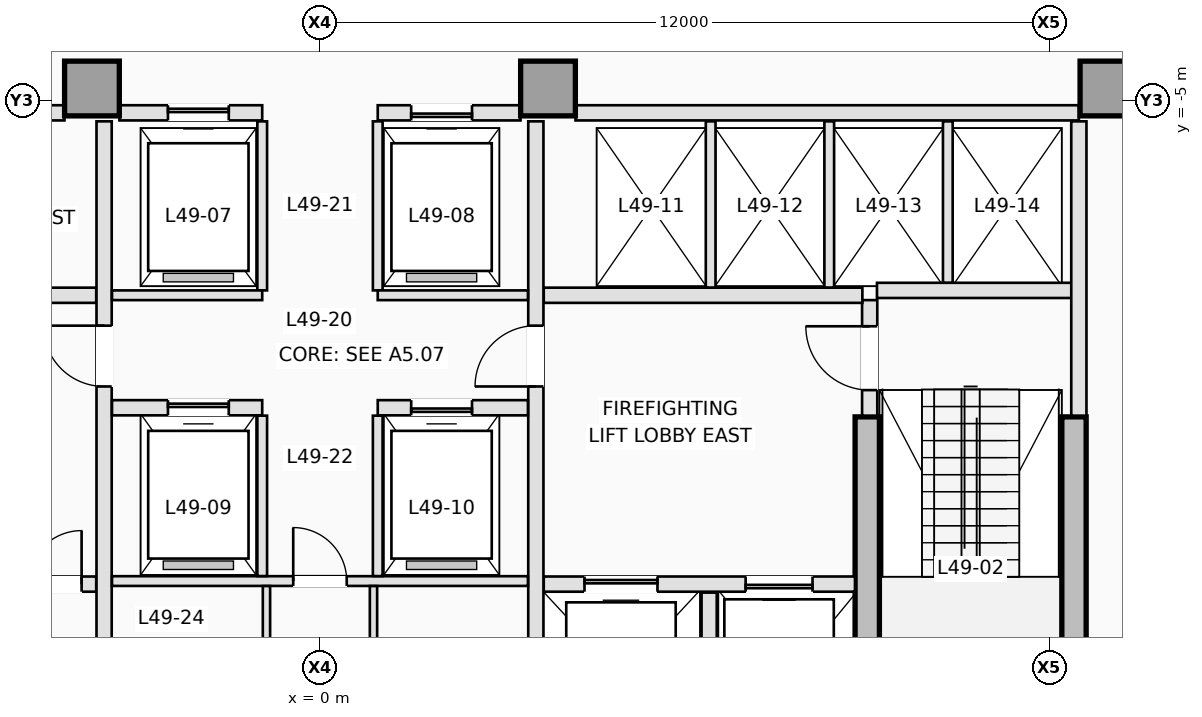
"""IFC4 building model, lengths in metres.
Left out: names, types, materials, properties, quantities, classifications, styles, units other than length and angle.
Written with IfcOpenShell. Run it as: python <this file> out.ifc"""

import sys

from ifc_helpers import new_model, si_unit, direction, frame, frame_2d, origin, origin_2d, place, context, subcontext, project, spatial, rectangle, extrude, element, fill, save


model = new_model("IFC4")
c1 = context("Model", 3, precision=1e-05, world=origin(), true_north=direction((0.0, 1.0)))
c2 = subcontext(c1, "Body", "Model", "MODEL_VIEW")
j1 = project(units=[si_unit("LENGTHUNIT", "METRE"), si_unit("PLANEANGLEUNIT", "RADIAN")], contexts=[c1])
p1 = place(None, origin())
s1 = spatial("IfcSite", under=j1, at=p1, CompositionType="ELEMENT")
p2 = place(p1, origin())
s2 = spatial("IfcBuilding", under=s1, at=p2, CompositionType="ELEMENT")
p3 = place(p2, frame((0.0, 0.0, 179.0)))
s3 = spatial("IfcBuildingStorey", under=s2, at=p3, CompositionType="ELEMENT", Elevation=179.0)
p4 = place(p3, frame((12.4, -15.7, 0.0), z_axis=(0.0, 0.0, 1.0), x_axis=(0.0, 1.0, 0.0)))
e1 = element("IfcWall", 1, at=p4, inside=s3, PredefinedType="SHEAR", context=c2, shape_type="SweptSolid", body=[
    extrude(rectangle(XDim=5.5, YDim=0.4, at=frame_2d((2.75, 0.0))), origin(), (0.0, 0.0, 1.0), 4.4),
])
p5 = place(p3, frame((9.0, -16.15, 0.0), z_axis=(0.0, 0.0, 1.0), x_axis=(0.0, 1.0, 0.0)))
e2 = element("IfcWall", 2, at=p5, inside=s3, PredefinedType="SHEAR", context=c2, shape_type="SweptSolid", body=[
    extrude(rectangle(XDim=5.95, YDim=0.4, at=frame_2d((2.975, 0.0))), origin(), (0.0, 0.0, 1.0), 4.4),
])
for number, where, z_axis, x_axis in (
    (3, (-3.75, -4.8, 0.0), (0.0, 0.0, 1.0), (1.0, 0.0, 0.0)),
    (4, (3.75, -4.8, 0.0), (0.0, 0.0, 1.0), (1.0, 0.0, 0.0)),
    (5, (12.95, -4.8, 0.0), (0.0, 0.0, 1.0), (1.0, 0.0, 0.0)),
):
    element("IfcColumn", number, at=place(p3, frame(where, z_axis=z_axis, x_axis=x_axis)), inside=s3, PredefinedType="COLUMN", context=c2, shape_type="SweptSolid", body=[
        extrude(rectangle(XDim=0.9, YDim=0.9, at=origin_2d()), origin(), (0.0, 0.0, 1.0), 4.4),
    ])
p6 = place(p3, frame((9.04, -10.18, 0.0), z_axis=(0.0, 0.0, 1.0), x_axis=(0.0, 1.0, 0.0)))
e6 = element("IfcWall", 6, at=p6, inside=s3, PredefinedType="PARTITIONING", context=c2, shape_type="SweptSolid", body=[
    extrude(rectangle(XDim=1.9, YDim=0.25, at=frame_2d((0.95, 0.0))), origin(), (0.0, 0.0, 1.0), 4.15),
])
p7 = place(p6, frame((0.42, 0.0, 0.0)))
e7 = element("IfcOpeningElement", 7, at=p7, cuts=e6, PredefinedType="OPENING", context=c2, shape_type="SweptSolid", body=[
    extrude(rectangle(XDim=1.05, YDim=2.15, at=frame_2d((0.525, 1.075))), frame((0.0, 0.135, 0.0), z_axis=(0.0, -1.0, 0.0), x_axis=(1.0, 0.0, 0.0)), (0.0, 0.0, 1.0), 0.27),
])
p8 = place(p3, frame((9.16, -8.12, 0.0), z_axis=(0.0, 0.0, 1.0), x_axis=(1.0, 0.0, 0.0)))
e8 = element("IfcWall", 8, at=p8, inside=s3, PredefinedType="PARTITIONING", context=c2, shape_type="SweptSolid", body=[
    extrude(rectangle(XDim=3.22, YDim=0.25, at=frame_2d((1.61, 0.0))), origin(), (0.0, 0.0, 1.0), 4.15),
])
p9 = place(p3, frame((12.48, -10.18, 0.0), z_axis=(0.0, 0.0, 1.0), x_axis=(0.0, 1.0, 0.0)))
e9 = element("IfcWall", 9, at=p9, inside=s3, PredefinedType="PARTITIONING", context=c2, shape_type="SweptSolid", body=[
    extrude(rectangle(XDim=4.84, YDim=0.25, at=frame_2d((2.42, 0.0))), origin(), (0.0, 0.0, 1.0), 4.15),
])
p10 = place(p3, frame((-8.798, -12.95, 0.0), z_axis=(0.0, 0.0, 1.0), x_axis=(1.0, 0.0, 0.0)))
e10 = element("IfcWall", 10, at=p10, inside=s3, PredefinedType="PARTITIONING", context=c2, shape_type="SweptSolid", body=[
    extrude(rectangle(XDim=5.118, YDim=0.25, at=frame_2d((2.559, 0.0))), origin(), (0.0, 0.0, 1.0), 4.15),
])
p11 = place(p10, frame((0.698, 0.0, 0.0)))
e11 = element("IfcOpeningElement", 11, at=p11, cuts=e10, PredefinedType="OPENING", context=c2, shape_type="SweptSolid", body=[
    extrude(rectangle(XDim=1.1, YDim=2.15, at=frame_2d((0.55, 1.075))), frame((0.0, 0.135, 0.0), z_axis=(0.0, -1.0, 0.0), x_axis=(1.0, 0.0, 0.0)), (0.0, 0.0, 1.0), 0.27),
])
p12 = place(p10, frame((2.598, 0.0, 0.0)))
e12 = element("IfcOpeningElement", 12, at=p12, cuts=e10, PredefinedType="OPENING", context=c2, shape_type="SweptSolid", body=[
    extrude(rectangle(XDim=0.88, YDim=2.1, at=frame_2d((0.44, 1.05))), frame((0.0, 0.135, 0.0), z_axis=(0.0, -1.0, 0.0), x_axis=(1.0, 0.0, 0.0)), (0.0, 0.0, 1.0), 0.27),
])
p13 = place(p10, frame((3.998, 0.0, 0.0)))
e13 = element("IfcOpeningElement", 13, at=p13, cuts=e10, PredefinedType="OPENING", context=c2, shape_type="SweptSolid", body=[
    extrude(rectangle(XDim=0.88, YDim=2.1, at=frame_2d((0.44, 1.05))), frame((0.0, 0.135, 0.0), z_axis=(0.0, -1.0, 0.0), x_axis=(1.0, 0.0, 0.0)), (0.0, 0.0, 1.0), 0.27),
])
p14 = place(p3, frame((3.68, -12.95, 0.0), z_axis=(0.0, 0.0, 1.0), x_axis=(1.0, 0.0, 0.0)))
e14 = element("IfcWall", 14, at=p14, inside=s3, PredefinedType="PARTITIONING", context=c2, shape_type="SweptSolid", body=[
    extrude(rectangle(XDim=5.118, YDim=0.25, at=frame_2d((2.559, 0.0))), origin(), (0.0, 0.0, 1.0), 4.15),
])
p15 = place(p14, frame((3.32, 0.0, 0.0)))
e15 = element("IfcOpeningElement", 15, at=p15, cuts=e14, PredefinedType="OPENING", context=c2, shape_type="SweptSolid", body=[
    extrude(rectangle(XDim=1.1, YDim=2.15, at=frame_2d((0.55, 1.075))), frame((0.0, 0.135, 0.0), z_axis=(0.0, -1.0, 0.0), x_axis=(1.0, 0.0, 0.0)), (0.0, 0.0, 1.0), 0.27),
])
p16 = place(p14, frame((0.67, 0.0, 0.0)))
e16 = element("IfcOpeningElement", 16, at=p16, cuts=e14, PredefinedType="OPENING", context=c2, shape_type="SweptSolid", body=[
    extrude(rectangle(XDim=1.2, YDim=2.15, at=frame_2d((0.6, 1.075))), frame((0.0, 0.135, 0.0), z_axis=(0.0, -1.0, 0.0), x_axis=(1.0, 0.0, 0.0)), (0.0, 0.0, 1.0), 0.27),
])
p17 = place(p3, frame((6.4, -15.92, 0.0), z_axis=(0.0, 0.0, 1.0), x_axis=(0.0, 1.0, 0.0)))
e17 = element("IfcWall", 17, at=p17, inside=s3, PredefinedType="PARTITIONING", context=c2, shape_type="SweptSolid", body=[
    extrude(rectangle(XDim=2.83, YDim=0.25, at=frame_2d((1.415, 0.0))), origin(), (0.0, 0.0, 1.0), 4.15),
])
for number, where, z_axis, x_axis in (
    (18, (-8.92, -8.2, 0.0), (0.0, 0.0, 1.0), (1.0, 0.0, 0.0)),
    (19, (3.68, -8.2, 0.0), (0.0, 0.0, 1.0), (1.0, 0.0, 0.0)),
):
    element("IfcWall", number, at=place(p3, frame(where, z_axis=z_axis, x_axis=x_axis)), inside=s3, PredefinedType="PARTITIONING", context=c2, shape_type="SweptSolid", body=[
        extrude(rectangle(XDim=5.24, YDim=0.25, at=frame_2d((2.62, 0.0))), origin(), (0.0, 0.0, 1.0), 4.15),
    ])
p18 = place(p3, frame((-3.55, -15.898, 0.0), z_axis=(0.0, 0.0, 1.0), x_axis=(0.0, 1.0, 0.0)))
e20 = element("IfcWall", 20, at=p18, inside=s3, PredefinedType="PARTITIONING", context=c2, shape_type="SweptSolid", body=[
    extrude(rectangle(XDim=10.558, YDim=0.25, at=frame_2d((5.279, 0.0))), origin(), (0.0, 0.0, 1.0), 4.15),
])
p19 = place(p18, frame((6.198, 0.0, 0.0)))
e21 = element("IfcOpeningElement", 21, at=p19, cuts=e20, PredefinedType="OPENING", context=c2, shape_type="SweptSolid", body=[
    extrude(rectangle(XDim=1.0, YDim=2.15, at=frame_2d((0.5, 1.075))), frame((0.0, 0.135, 0.0), z_axis=(0.0, -1.0, 0.0), x_axis=(1.0, 0.0, 0.0)), (0.0, 0.0, 1.0), 0.27),
])
p20 = place(p3, frame((3.55, -15.898, 0.0), z_axis=(0.0, 0.0, 1.0), x_axis=(0.0, 1.0, 0.0)))
e22 = element("IfcWall", 22, at=p20, inside=s3, PredefinedType="PARTITIONING", context=c2, shape_type="SweptSolid", body=[
    extrude(rectangle(XDim=10.558, YDim=0.25, at=frame_2d((5.279, 0.0))), origin(), (0.0, 0.0, 1.0), 4.15),
])
p21 = place(p20, frame((6.198, 0.0, 0.0)))
e23 = element("IfcOpeningElement", 23, at=p21, cuts=e22, PredefinedType="OPENING", context=c2, shape_type="SweptSolid", body=[
    extrude(rectangle(XDim=1.0, YDim=2.15, at=frame_2d((0.5, 1.075))), frame((0.0, 0.135, 0.0), z_axis=(0.0, -1.0, 0.0), x_axis=(1.0, 0.0, 0.0)), (0.0, 0.0, 1.0), 0.27),
])
p22 = place(p3, frame((-12.48, -5.2, 0.0), z_axis=(0.0, 0.0, 1.0), x_axis=(1.0, 0.0, 0.0)))
e24 = element("IfcWall", 24, at=p22, inside=s3, PredefinedType="PARTITIONING", context=c2, shape_type="SweptSolid", body=[
    extrude(rectangle(XDim=8.278, YDim=0.25, at=frame_2d((4.139, 0.0))), origin(), (0.0, 0.0, 1.0), 4.15),
])
p23 = place(p22, frame((1.85, 0.0, 0.0)))
e25 = element("IfcOpeningElement", 25, at=p23, cuts=e24, PredefinedType="OPENING", context=c2, shape_type="SweptSolid", body=[
    extrude(rectangle(XDim=1.05, YDim=2.12, at=frame_2d((0.525, 1.06))), frame((0.0, 0.135, 0.0), z_axis=(0.0, -1.0, 0.0), x_axis=(1.0, 0.0, 0.0)), (0.0, 0.0, 1.0), 0.27),
])
p24 = place(p22, frame((6.15, 0.0, 0.0)))
e26 = element("IfcOpeningElement", 26, at=p24, cuts=e24, PredefinedType="OPENING", context=c2, shape_type="SweptSolid", body=[
    extrude(rectangle(XDim=1.05, YDim=2.12, at=frame_2d((0.525, 1.06))), frame((0.0, 0.135, 0.0), z_axis=(0.0, -1.0, 0.0), x_axis=(1.0, 0.0, 0.0)), (0.0, 0.0, 1.0), 0.27),
])
p25 = place(p3, frame((4.202, -5.2, 0.0), z_axis=(0.0, 0.0, 1.0), x_axis=(1.0, 0.0, 0.0)))
e27 = element("IfcWall", 27, at=p25, inside=s3, PredefinedType="PARTITIONING", context=c2, shape_type="SweptSolid", body=[
    extrude(rectangle(XDim=8.278, YDim=0.25, at=frame_2d((4.139, 0.0))), origin(), (0.0, 0.0, 1.0), 4.15),
])
p26 = place(p3, frame((-3.298, -5.2, 0.0), z_axis=(0.0, 0.0, 1.0), x_axis=(1.0, 0.0, 0.0)))
e28 = element("IfcWall", 28, at=p26, inside=s3, PredefinedType="PARTITIONING", context=c2, shape_type="SweptSolid", body=[
    extrude(rectangle(XDim=2.348, YDim=0.25, at=frame_2d((1.174, 0.0))), origin(), (0.0, 0.0, 1.0), 4.15),
])
p27 = place(p26, frame((0.798, 0.0, 0.0)))
e29 = element("IfcOpeningElement", 29, at=p27, cuts=e28, PredefinedType="OPENING", context=c2, shape_type="SweptSolid", body=[
    extrude(rectangle(XDim=1.0, YDim=2.15, at=frame_2d((0.5, 1.075))), frame((0.0, 0.135, 0.0), z_axis=(0.0, -1.0, 0.0), x_axis=(1.0, 0.0, 0.0)), (0.0, 0.0, 1.0), 0.27),
])
p28 = place(p3, frame((0.95, -5.2, 0.0), z_axis=(0.0, 0.0, 1.0), x_axis=(1.0, 0.0, 0.0)))
e30 = element("IfcWall", 30, at=p28, inside=s3, PredefinedType="PARTITIONING", context=c2, shape_type="SweptSolid", body=[
    extrude(rectangle(XDim=2.348, YDim=0.25, at=frame_2d((1.174, 0.0))), origin(), (0.0, 0.0, 1.0), 4.15),
])
p29 = place(p28, frame((0.55, 0.0, 0.0)))
e31 = element("IfcOpeningElement", 31, at=p29, cuts=e30, PredefinedType="OPENING", context=c2, shape_type="SweptSolid", body=[
    extrude(rectangle(XDim=1.0, YDim=2.15, at=frame_2d((0.5, 1.075))), frame((0.0, 0.135, 0.0), z_axis=(0.0, -1.0, 0.0), x_axis=(1.0, 0.0, 0.0)), (0.0, 0.0, 1.0), 0.27),
])
for number, where, z_axis, x_axis in (
    (32, (6.425, -8.073, 0.0), (0.0, 0.0, 1.0), (0.0, 1.0, 0.0)),
    (33, (8.375, -8.073, 0.0), (0.0, 0.0, 1.0), (0.0, 1.0, 0.0)),
):
    element("IfcWall", number, at=place(p3, frame(where, z_axis=z_axis, x_axis=x_axis)), inside=s3, PredefinedType="PARTITIONING", context=c2, shape_type="SweptSolid", body=[
        extrude(rectangle(XDim=2.733, YDim=0.16, at=frame_2d((1.366, 0.0))), origin(), (0.0, 0.0, 1.0), 4.15),
    ])
p30 = place(p3, frame((10.325, -7.993, 0.0), z_axis=(0.0, 0.0, 1.0), x_axis=(0.0, 1.0, 0.0)))
e34 = element("IfcWall", 34, at=p30, inside=s3, PredefinedType="PARTITIONING", context=c2, shape_type="SweptSolid", body=[
    extrude(rectangle(XDim=2.653, YDim=0.16, at=frame_2d((1.326, 0.0))), origin(), (0.0, 0.0, 1.0), 4.15),
])
for number, where, z_axis, x_axis in (
    (35, (-0.95, -8.12, 0.0), (0.0, 0.0, 1.0), (0.0, 1.0, 0.0)),
    (36, (0.95, -8.12, 0.0), (0.0, 0.0, 1.0), (0.0, 1.0, 0.0)),
):
    element("IfcWall", number, at=place(p3, frame(where, z_axis=z_axis, x_axis=x_axis)), inside=s3, PredefinedType="PARTITIONING", context=c2, shape_type="SweptSolid", body=[
        extrude(rectangle(XDim=2.78, YDim=0.16, at=frame_2d((1.39, 0.0))), origin(), (0.0, 0.0, 1.0), 4.15),
    ])
for number, where, z_axis, x_axis in (
    (37, (-3.42, -8.2, 0.0), (0.0, 0.0, 1.0), (1.0, 0.0, 0.0)),
    (38, (0.95, -8.2, 0.0), (0.0, 0.0, 1.0), (1.0, 0.0, 0.0)),
):
    element("IfcWall", number, at=place(p3, frame(where, z_axis=z_axis, x_axis=x_axis)), inside=s3, PredefinedType="PARTITIONING", context=c2, shape_type="SweptSolid", body=[
        extrude(rectangle(XDim=2.47, YDim=0.16, at=frame_2d((1.235, 0.0))), origin(), (0.0, 0.0, 1.0), 4.15),
    ])
p31 = place(p3, frame((-3.42, -10.05, 0.0), z_axis=(0.0, 0.0, 1.0), x_axis=(1.0, 0.0, 0.0)))
e39 = element("IfcWall", 39, at=p31, inside=s3, PredefinedType="PARTITIONING", context=c2, shape_type="SweptSolid", body=[
    extrude(rectangle(XDim=2.47, YDim=0.25, at=frame_2d((1.235, 0.0))), origin(), (0.0, 0.0, 1.0), 4.15),
])
p32 = place(p31, frame((0.92, 0.0, 0.0)))
e40 = element("IfcOpeningElement", 40, at=p32, cuts=e39, PredefinedType="OPENING", context=c2, shape_type="SweptSolid", body=[
    extrude(rectangle(XDim=1.0, YDim=2.15, at=frame_2d((0.5, 1.075))), frame((0.0, 0.135, 0.0), z_axis=(0.0, -1.0, 0.0), x_axis=(1.0, 0.0, 0.0)), (0.0, 0.0, 1.0), 0.27),
])
p33 = place(p3, frame((0.95, -10.05, 0.0), z_axis=(0.0, 0.0, 1.0), x_axis=(1.0, 0.0, 0.0)))
e41 = element("IfcWall", 41, at=p33, inside=s3, PredefinedType="PARTITIONING", context=c2, shape_type="SweptSolid", body=[
    extrude(rectangle(XDim=2.47, YDim=0.25, at=frame_2d((1.235, 0.0))), origin(), (0.0, 0.0, 1.0), 4.15),
])
p34 = place(p33, frame((0.55, 0.0, 0.0)))
e42 = element("IfcOpeningElement", 42, at=p34, cuts=e41, PredefinedType="OPENING", context=c2, shape_type="SweptSolid", body=[
    extrude(rectangle(XDim=1.0, YDim=2.15, at=frame_2d((0.5, 1.075))), frame((0.0, 0.135, 0.0), z_axis=(0.0, -1.0, 0.0), x_axis=(1.0, 0.0, 0.0)), (0.0, 0.0, 1.0), 0.27),
])
p35 = place(p3, frame((-3.42, -12.9, 0.0), z_axis=(0.0, 0.0, 1.0), x_axis=(1.0, 0.0, 0.0)))
e43 = element("IfcWall", 43, at=p35, inside=s3, PredefinedType="PARTITIONING", context=c2, shape_type="SweptSolid", body=[
    extrude(rectangle(XDim=6.84, YDim=0.16, at=frame_2d((3.42, 0.0))), origin(), (0.0, 0.0, 1.0), 4.15),
])
p36 = place(p35, frame((2.98, 0.0, 0.0)))
e44 = element("IfcOpeningElement", 44, at=p36, cuts=e43, PredefinedType="OPENING", context=c2, shape_type="SweptSolid", body=[
    extrude(rectangle(XDim=0.88, YDim=2.12, at=frame_2d((0.44, 1.06))), frame((0.0, 0.09, 0.0), z_axis=(0.0, -1.0, 0.0), x_axis=(1.0, 0.0, 0.0)), (0.0, 0.0, 1.0), 0.18),
])
for number, where, z_axis, x_axis in (
    (45, (-0.95, -12.818, 0.0), (0.0, 0.0, 1.0), (0.0, 1.0, 0.0)),
    (46, (0.95, -12.818, 0.0), (0.0, 0.0, 1.0), (0.0, 1.0, 0.0)),
):
    element("IfcWall", number, at=place(p3, frame(where, z_axis=z_axis, x_axis=x_axis)), inside=s3, PredefinedType="PARTITIONING", context=c2, shape_type="SweptSolid", body=[
        extrude(rectangle(XDim=2.638, YDim=0.16, at=frame_2d((1.319, 0.0))), origin(), (0.0, 0.0, 1.0), 4.15),
    ])
p37 = place(p3, frame((-0.88, -16.02, 0.0), z_axis=(0.0, 0.0, 1.0), x_axis=(0.0, 1.0, 0.0)))
e47 = element("IfcWall", 47, at=p37, inside=s3, PredefinedType="PARTITIONING", context=c2, shape_type="SweptSolid", body=[
    extrude(rectangle(XDim=3.038, YDim=0.12, at=frame_2d((1.519, 0.0))), origin(), (0.0, 0.0, 1.0), 4.15),
])
p38 = place(p37, frame((1.05, 0.0, 0.0)))
e48 = element("IfcOpeningElement", 48, at=p38, cuts=e47, PredefinedType="OPENING", context=c2, shape_type="SweptSolid", body=[
    extrude(rectangle(XDim=0.88, YDim=2.12, at=frame_2d((0.44, 1.06))), frame((0.0, 0.07, 0.0), z_axis=(0.0, -1.0, 0.0), x_axis=(1.0, 0.0, 0.0)), (0.0, 0.0, 1.0), 0.14),
])
p39 = place(p3, frame((0.88, -16.02, 0.0), z_axis=(0.0, 0.0, 1.0), x_axis=(0.0, 1.0, 0.0)))
e49 = element("IfcWall", 49, at=p39, inside=s3, PredefinedType="PARTITIONING", context=c2, shape_type="SweptSolid", body=[
    extrude(rectangle(XDim=3.038, YDim=0.12, at=frame_2d((1.519, 0.0))), origin(), (0.0, 0.0, 1.0), 4.15),
])
p40 = place(p39, frame((1.05, 0.0, 0.0)))
e50 = element("IfcOpeningElement", 50, at=p40, cuts=e49, PredefinedType="OPENING", context=c2, shape_type="SweptSolid", body=[
    extrude(rectangle(XDim=0.88, YDim=2.12, at=frame_2d((0.44, 1.06))), frame((0.0, 0.07, 0.0), z_axis=(0.0, -1.0, 0.0), x_axis=(1.0, 0.0, 0.0)), (0.0, 0.0, 1.0), 0.14),
])
p41 = place(p27, origin())
e51 = element("IfcDoor", 51, at=p41, inside=s3, OperationType="SLIDING_TO_LEFT", PredefinedType="DOOR", context=c2, shape_type="SweptSolid", body=[
    extrude(rectangle(XDim=1.0, YDim=2.15, at=frame_2d((0.5, 1.075))), frame((0.0, 0.025, 0.0), z_axis=(0.0, -1.0, 0.0), x_axis=(1.0, 0.0, 0.0)), (0.0, 0.0, 1.0), 0.05),
])
fill(e29, e51)
p42 = place(p29, origin())
e52 = element("IfcDoor", 52, at=p42, inside=s3, OperationType="SLIDING_TO_RIGHT", PredefinedType="DOOR", context=c2, shape_type="SweptSolid", body=[
    extrude(rectangle(XDim=1.0, YDim=2.15, at=frame_2d((0.5, 1.075))), frame((0.0, 0.025, 0.0), z_axis=(0.0, -1.0, 0.0), x_axis=(1.0, 0.0, 0.0)), (0.0, 0.0, 1.0), 0.05),
])
fill(e31, e52)
p43 = place(p15, origin())
e53 = element("IfcDoor", 53, at=p43, inside=s3, OperationType="SLIDING_TO_RIGHT", PredefinedType="DOOR", context=c2, shape_type="SweptSolid", body=[
    extrude(rectangle(XDim=1.1, YDim=2.15, at=frame_2d((0.55, 1.075))), frame((0.0, 0.025, 0.0), z_axis=(0.0, -1.0, 0.0), x_axis=(1.0, 0.0, 0.0)), (0.0, 0.0, 1.0), 0.05),
])
fill(e15, e53)
p44 = place(p16, origin())
e54 = element("IfcDoor", 54, at=p44, inside=s3, OperationType="SLIDING_TO_LEFT", PredefinedType="DOOR", context=c2, shape_type="SweptSolid", body=[
    extrude(rectangle(XDim=1.2, YDim=2.15, at=frame_2d((0.6, 1.075))), frame((0.0, 0.025, 0.0), z_axis=(0.0, -1.0, 0.0), x_axis=(1.0, 0.0, 0.0)), (0.0, 0.0, 1.0), 0.05),
])
fill(e16, e54)
p45 = place(p32, origin())
e55 = element("IfcDoor", 55, at=p45, inside=s3, OperationType="SLIDING_TO_LEFT", PredefinedType="DOOR", context=c2, shape_type="SweptSolid", body=[
    extrude(rectangle(XDim=1.0, YDim=2.15, at=frame_2d((0.5, 1.075))), frame((0.0, 0.025, 0.0), z_axis=(0.0, -1.0, 0.0), x_axis=(1.0, 0.0, 0.0)), (0.0, 0.0, 1.0), 0.05),
])
fill(e40, e55)
p46 = place(p34, origin())
e56 = element("IfcDoor", 56, at=p46, inside=s3, OperationType="SLIDING_TO_RIGHT", PredefinedType="DOOR", context=c2, shape_type="SweptSolid", body=[
    extrude(rectangle(XDim=1.0, YDim=2.15, at=frame_2d((0.5, 1.075))), frame((0.0, 0.025, 0.0), z_axis=(0.0, -1.0, 0.0), x_axis=(1.0, 0.0, 0.0)), (0.0, 0.0, 1.0), 0.05),
])
fill(e42, e56)
p47 = place(p7, origin())
e57 = element("IfcDoor", 57, at=p47, inside=s3, OperationType="SINGLE_SWING_RIGHT", PredefinedType="DOOR", context=c2, shape_type="SweptSolid", body=[
    extrude(rectangle(XDim=1.05, YDim=2.15, at=frame_2d((0.525, 1.075))), frame((0.0, 0.025, 0.0), z_axis=(0.0, -1.0, 0.0), x_axis=(1.0, 0.0, 0.0)), (0.0, 0.0, 1.0), 0.05),
])
fill(e7, e57)
p48 = place(p13, origin())
e58 = element("IfcDoor", 58, at=p48, inside=s3, OperationType="SINGLE_SWING_RIGHT", PredefinedType="TRAPDOOR", context=c2, shape_type="SweptSolid", body=[
    extrude(rectangle(XDim=0.88, YDim=2.1, at=frame_2d((0.44, 1.05))), frame((0.0, 0.025, 0.0), z_axis=(0.0, -1.0, 0.0), x_axis=(1.0, 0.0, 0.0)), (0.0, 0.0, 1.0), 0.05),
])
fill(e13, e58)
p49 = place(p19, origin())
e59 = element("IfcDoor", 59, at=p49, inside=s3, OperationType="SINGLE_SWING_RIGHT", PredefinedType="DOOR", context=c2, shape_type="SweptSolid", body=[
    extrude(rectangle(XDim=1.0, YDim=2.15, at=frame_2d((0.5, 1.075))), frame((0.0, 0.025, 0.0), z_axis=(0.0, -1.0, 0.0), x_axis=(1.0, 0.0, 0.0)), (0.0, 0.0, 1.0), 0.05),
])
fill(e21, e59)
p50 = place(p21, origin())
e60 = element("IfcDoor", 60, at=p50, inside=s3, OperationType="SINGLE_SWING_LEFT", PredefinedType="DOOR", context=c2, shape_type="SweptSolid", body=[
    extrude(rectangle(XDim=1.0, YDim=2.15, at=frame_2d((0.5, 1.075))), frame((0.0, 0.025, 0.0), z_axis=(0.0, -1.0, 0.0), x_axis=(1.0, 0.0, 0.0)), (0.0, 0.0, 1.0), 0.05),
])
fill(e23, e60)
p51 = place(p36, origin())
e61 = element("IfcDoor", 61, at=p51, inside=s3, OperationType="SINGLE_SWING_LEFT", PredefinedType="DOOR", context=c2, shape_type="SweptSolid", body=[
    extrude(rectangle(XDim=0.88, YDim=2.12, at=frame_2d((0.44, 1.06))), frame((0.0, 0.025, 0.0), z_axis=(0.0, -1.0, 0.0), x_axis=(1.0, 0.0, 0.0)), (0.0, 0.0, 1.0), 0.05),
])
fill(e44, e61)
save(model, sys.argv[1])
